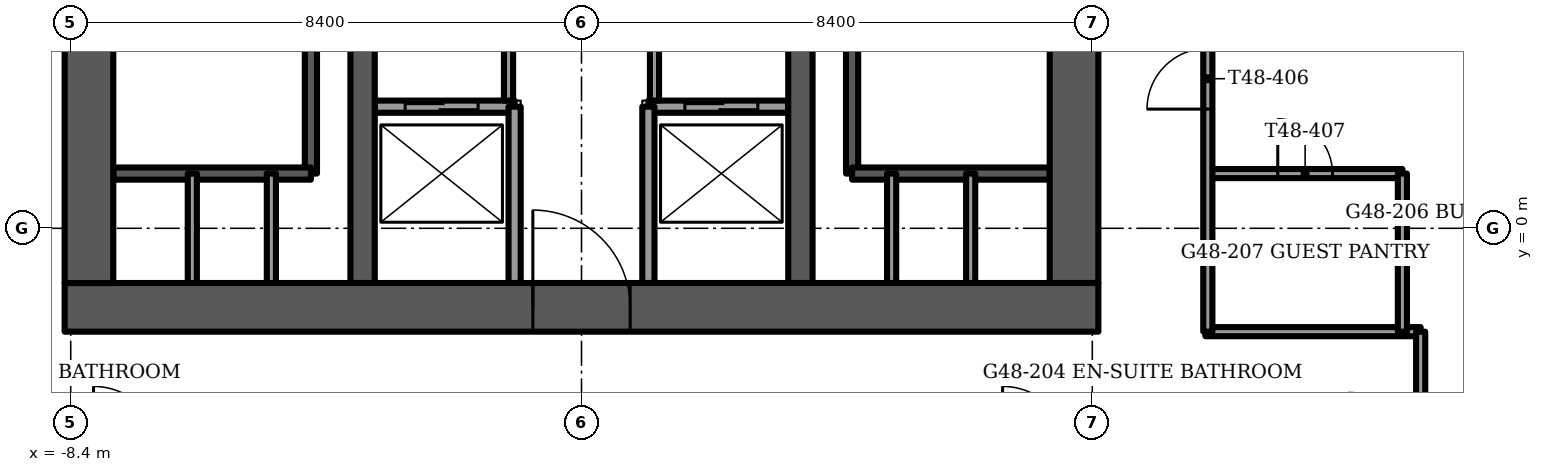
"""IFC4 building model, lengths in metres.
Left out: names, types, materials, properties, quantities, classifications, styles, units other than length and angle.
Written with IfcOpenShell. Run it as: python <this file> out.ifc"""

import sys

from ifc_helpers import new_model, si_unit, direction, frame, frame_2d, origin, place, context, subcontext, project, spatial, rectangle, extrude, element, fill, save


model = new_model("IFC4")
c1 = context("Model", 3, precision=1e-05, world=origin(), true_north=direction((0.0, 1.0)))
c2 = subcontext(c1, "Body", "Model", "MODEL_VIEW")
j1 = project(units=[si_unit("LENGTHUNIT", "METRE"), si_unit("PLANEANGLEUNIT", "RADIAN")], contexts=[c1])
p1 = place(None, origin())
s1 = spatial("IfcSite", under=j1, at=p1, CompositionType="ELEMENT")
p2 = place(p1, origin())
s2 = spatial("IfcBuilding", under=s1, at=p2, CompositionType="ELEMENT")
p3 = place(p2, frame((0.0, 0.0, 194.5)))
s3 = spatial("IfcBuildingStorey", under=s2, at=p3, CompositionType="ELEMENT", Elevation=194.5)
p4 = place(p3, frame((-8.5, -1.3, -0.3), z_axis=(0.0, 0.0, 1.0), x_axis=(1.0, 0.0, 0.0)))
e1 = element("IfcWall", 1, at=p4, inside=s3, PredefinedType="SHEAR", context=c2, shape_type="SweptSolid", body=[
    extrude(rectangle(XDim=17.0, YDim=0.8, at=frame_2d((8.5, 0.0))), origin(), (0.0, 0.0, 1.0), 3.75),
])
p5 = place(p4, frame((7.7, 0.0, 0.0)))
e2 = element("IfcOpeningElement", 2, at=p5, cuts=e1, PredefinedType="OPENING", context=c2, shape_type="SweptSolid", body=[
    extrude(rectangle(XDim=1.6, YDim=2.1, at=frame_2d((0.8, 1.05))), frame((0.0, 0.4, 0.0), z_axis=(0.0, -1.0, 0.0), x_axis=(1.0, 0.0, 0.0)), (0.0, 0.0, 1.0), 0.8),
])
p6 = place(p3, frame((-8.1, -0.9, -0.3), z_axis=(0.0, 0.0, 1.0), x_axis=(0.0, 1.0, 0.0)))
e3 = element("IfcWall", 3, at=p6, inside=s3, PredefinedType="SHEAR", context=c2, shape_type="SweptSolid", body=[
    extrude(rectangle(XDim=9.8, YDim=0.8, at=frame_2d((4.9, 0.0))), origin(), (0.0, 0.0, 1.0), 3.75),
])
p7 = place(p6, frame((8.15, 0.0, 0.0)))
e4 = element("IfcOpeningElement", 4, at=p7, cuts=e3, PredefinedType="OPENING", context=c2, shape_type="SweptSolid", body=[
    extrude(rectangle(XDim=1.1, YDim=2.1, at=frame_2d((0.55, 1.05))), frame((0.0, 0.4, 0.0), z_axis=(0.0, -1.0, 0.0), x_axis=(1.0, 0.0, 0.0)), (0.0, 0.0, 1.0), 0.8),
])
p8 = place(p3, frame((8.1, -0.9, -0.3), z_axis=(0.0, 0.0, 1.0), x_axis=(0.0, 1.0, 0.0)))
e5 = element("IfcWall", 5, at=p8, inside=s3, PredefinedType="SHEAR", context=c2, shape_type="SweptSolid", body=[
    extrude(rectangle(XDim=9.8, YDim=0.8, at=frame_2d((4.9, 0.0))), origin(), (0.0, 0.0, 1.0), 3.75),
])
p9 = place(p8, frame((8.15, 0.0, 0.0)))
e6 = element("IfcOpeningElement", 6, at=p9, cuts=e5, PredefinedType="OPENING", context=c2, shape_type="SweptSolid", body=[
    extrude(rectangle(XDim=1.1, YDim=2.1, at=frame_2d((0.55, 1.05))), frame((0.0, 0.4, 0.0), z_axis=(0.0, -1.0, 0.0), x_axis=(1.0, 0.0, 0.0)), (0.0, 0.0, 1.0), 0.8),
])
for number, where, z_axis, x_axis in (
    (7, (-3.6, -0.9, -0.3), (0.0, 0.0, 1.0), (0.0, 1.0, 0.0)),
    (8, (3.6, -0.9, -0.3), (0.0, 0.0, 1.0), (0.0, 1.0, 0.0)),
):
    element("IfcWall", number, at=place(p3, frame(where, z_axis=z_axis, x_axis=x_axis)), inside=s3, PredefinedType="SHEAR", context=c2, shape_type="SweptSolid", body=[
        extrude(rectangle(XDim=9.8, YDim=0.4, at=frame_2d((4.9, 0.0))), origin(), (0.0, 0.0, 1.0), 3.75),
    ])
p10 = place(p3, frame((11.824, -10.37, 0.0), z_axis=(0.0, 0.0, 1.0), x_axis=(0.499996992154, 0.866027140358, 0.0)))
e9 = element("IfcWall", 9, at=p10, inside=s3, PredefinedType="SOLIDWALL", context=c2, shape_type="SweptSolid", body=[
    extrude(rectangle(XDim=10.264, YDim=0.15, at=frame_2d((5.132, 0.0))), origin(), (0.0, 0.0, 1.0), 3.45),
])
p11 = place(p10, frame((1.269, 0.0, 0.15)))
e10 = element("IfcOpeningElement", 10, at=p11, cuts=e9, PredefinedType="OPENING", context=c2, shape_type="SweptSolid", body=[
    extrude(rectangle(XDim=1.6, YDim=2.2, at=frame_2d((0.8, 1.1))), frame((0.0, 0.075, 0.0), z_axis=(0.0, -1.0, 0.0), x_axis=(1.0, 0.0, 0.0)), (0.0, 0.0, 1.0), 0.15),
])
p12 = place(p10, frame((3.469, 0.0, 0.0)))
e11 = element("IfcOpeningElement", 11, at=p12, cuts=e9, PredefinedType="OPENING", context=c2, shape_type="SweptSolid", body=[
    extrude(rectangle(XDim=1.4, YDim=2.4, at=frame_2d((0.7, 1.2))), frame((0.0, 0.075, 0.0), z_axis=(0.0, -1.0, 0.0), x_axis=(1.0, 0.0, 0.0)), (0.0, 0.0, 1.0), 0.15),
])
p13 = place(p10, frame((5.469, 0.0, 0.15)))
e12 = element("IfcOpeningElement", 12, at=p13, cuts=e9, PredefinedType="OPENING", context=c2, shape_type="SweptSolid", body=[
    extrude(rectangle(XDim=1.6, YDim=2.2, at=frame_2d((0.8, 1.1))), frame((0.0, 0.075, 0.0), z_axis=(0.0, -1.0, 0.0), x_axis=(1.0, 0.0, 0.0)), (0.0, 0.0, 1.0), 0.15),
])
p14 = place(p3, frame((16.956, -0.417, 0.0), z_axis=(0.0, 0.0, 1.0), x_axis=(-0.499996992154, 0.866027140358, 0.0)))
e13 = element("IfcWall", 13, at=p14, inside=s3, PredefinedType="SOLIDWALL", context=c2, shape_type="SweptSolid", body=[
    extrude(rectangle(XDim=10.264, YDim=0.15, at=frame_2d((5.132, 0.0))), origin(), (0.0, 0.0, 1.0), 3.45),
])
p15 = place(p14, frame((0.739, 0.0, 0.15)))
e14 = element("IfcOpeningElement", 14, at=p15, cuts=e13, PredefinedType="OPENING", context=c2, shape_type="SweptSolid", body=[
    extrude(rectangle(XDim=1.6, YDim=2.2, at=frame_2d((0.8, 1.1))), frame((0.0, 0.075, 0.0), z_axis=(0.0, -1.0, 0.0), x_axis=(1.0, 0.0, 0.0)), (0.0, 0.0, 1.0), 0.15),
])
p16 = place(p14, frame((2.939, 0.0, 0.0)))
e15 = element("IfcOpeningElement", 15, at=p16, cuts=e13, PredefinedType="OPENING", context=c2, shape_type="SweptSolid", body=[
    extrude(rectangle(XDim=1.4, YDim=2.4, at=frame_2d((0.7, 1.2))), frame((0.0, 0.075, 0.0), z_axis=(0.0, -1.0, 0.0), x_axis=(1.0, 0.0, 0.0)), (0.0, 0.0, 1.0), 0.15),
])
p17 = place(p14, frame((7.139, 0.0, 0.15)))
e16 = element("IfcOpeningElement", 16, at=p17, cuts=e13, PredefinedType="OPENING", context=c2, shape_type="SweptSolid", body=[
    extrude(rectangle(XDim=1.4, YDim=2.2, at=frame_2d((0.7, 1.1))), frame((0.0, 0.075, 0.0), z_axis=(0.0, -1.0, 0.0), x_axis=(1.0, 0.0, 0.0)), (0.0, 0.0, 1.0), 0.15),
])
p18 = place(p3, frame((-3.4, 2.0, 0.0), z_axis=(0.0, 0.0, 1.0), x_axis=(1.0, 0.0, 0.0)))
e17 = element("IfcWall", 17, at=p18, inside=s3, PredefinedType="PARTITIONING", context=c2, shape_type="SweptSolid", body=[
    extrude(rectangle(XDim=2.3, YDim=0.2, at=frame_2d((1.15, 0.0))), origin(), (0.0, 0.0, 1.0), 3.45),
])
p19 = place(p18, frame((0.5, 0.0, 0.0)))
e18 = element("IfcOpeningElement", 18, at=p19, cuts=e17, PredefinedType="OPENING", context=c2, shape_type="SweptSolid", body=[
    extrude(rectangle(XDim=1.2, YDim=2.1, at=frame_2d((0.6, 1.05))), frame((0.0, 0.1, 0.0), z_axis=(0.0, -1.0, 0.0), x_axis=(1.0, 0.0, 0.0)), (0.0, 0.0, 1.0), 0.2),
])
p20 = place(p3, frame((1.1, 2.0, 0.0), z_axis=(0.0, 0.0, 1.0), x_axis=(1.0, 0.0, 0.0)))
e19 = element("IfcWall", 19, at=p20, inside=s3, PredefinedType="PARTITIONING", context=c2, shape_type="SweptSolid", body=[
    extrude(rectangle(XDim=2.3, YDim=0.2, at=frame_2d((1.15, 0.0))), origin(), (0.0, 0.0, 1.0), 3.45),
])
p21 = place(p20, frame((0.6, 0.0, 0.0)))
e20 = element("IfcOpeningElement", 20, at=p21, cuts=e19, PredefinedType="OPENING", context=c2, shape_type="SweptSolid", body=[
    extrude(rectangle(XDim=1.2, YDim=2.1, at=frame_2d((0.6, 1.05))), frame((0.0, 0.1, 0.0), z_axis=(0.0, -1.0, 0.0), x_axis=(1.0, 0.0, 0.0)), (0.0, 0.0, 1.0), 0.2),
])
for number, where, z_axis, x_axis in (
    (21, (-1.1, -0.9, 0.0), (0.0, 0.0, 1.0), (0.0, 1.0, 0.0)),
    (22, (1.1, -0.9, 0.0), (0.0, 0.0, 1.0), (0.0, 1.0, 0.0)),
):
    element("IfcWall", number, at=place(p3, frame(where, z_axis=z_axis, x_axis=x_axis)), inside=s3, PredefinedType="PARTITIONING", context=c2, shape_type="SweptSolid", body=[
        extrude(rectangle(XDim=2.9, YDim=0.2, at=frame_2d((1.45, 0.0))), origin(), (0.0, 0.0, 1.0), 3.45),
    ])
p22 = place(p3, frame((-4.45, 0.9, -0.3), z_axis=(0.0, 0.0, 1.0), x_axis=(0.0, 1.0, 0.0)))
e23 = element("IfcWall", 23, at=p22, inside=s3, PredefinedType="SOLIDWALL", context=c2, shape_type="SweptSolid", body=[
    extrude(rectangle(XDim=8.0, YDim=0.2, at=frame_2d((4.0, 0.0))), origin(), (0.0, 0.0, 1.0), 3.75),
])
p23 = place(p3, frame((-7.7, 0.9, -0.3), z_axis=(0.0, 0.0, 1.0), x_axis=(1.0, 0.0, 0.0)))
e24 = element("IfcWall", 24, at=p23, inside=s3, PredefinedType="SOLIDWALL", context=c2, shape_type="SweptSolid", body=[
    extrude(rectangle(XDim=3.25, YDim=0.2, at=frame_2d((1.625, 0.0))), origin(), (0.0, 0.0, 1.0), 3.75),
])
for number, where, z_axis, x_axis in (
    (25, (-6.4, -0.9, 0.0), (0.0, 0.0, 1.0), (0.0, 1.0, 0.0)),
    (26, (-5.1, -0.9, 0.0), (0.0, 0.0, 1.0), (0.0, 1.0, 0.0)),
):
    element("IfcWall", number, at=place(p3, frame(where, z_axis=z_axis, x_axis=x_axis)), inside=s3, PredefinedType="PARTITIONING", context=c2, shape_type="SweptSolid", body=[
        extrude(rectangle(XDim=1.8, YDim=0.15, at=frame_2d((0.9, 0.0))), origin(), (0.0, 0.0, 1.0), 3.45),
    ])
p24 = place(p3, frame((4.45, 0.9, -0.3), z_axis=(0.0, 0.0, 1.0), x_axis=(0.0, 1.0, 0.0)))
e27 = element("IfcWall", 27, at=p24, inside=s3, PredefinedType="SOLIDWALL", context=c2, shape_type="SweptSolid", body=[
    extrude(rectangle(XDim=8.0, YDim=0.2, at=frame_2d((4.0, 0.0))), origin(), (0.0, 0.0, 1.0), 3.75),
])
p25 = place(p3, frame((4.45, 0.9, -0.3), z_axis=(0.0, 0.0, 1.0), x_axis=(1.0, 0.0, 0.0)))
e28 = element("IfcWall", 28, at=p25, inside=s3, PredefinedType="SOLIDWALL", context=c2, shape_type="SweptSolid", body=[
    extrude(rectangle(XDim=3.25, YDim=0.2, at=frame_2d((1.625, 0.0))), origin(), (0.0, 0.0, 1.0), 3.75),
])
for number, where, z_axis, x_axis in (
    (29, (5.1, -0.9, 0.0), (0.0, 0.0, 1.0), (0.0, 1.0, 0.0)),
    (30, (6.4, -0.9, 0.0), (0.0, 0.0, 1.0), (0.0, 1.0, 0.0)),
):
    element("IfcWall", number, at=place(p3, frame(where, z_axis=z_axis, x_axis=x_axis)), inside=s3, PredefinedType="PARTITIONING", context=c2, shape_type="SweptSolid", body=[
        extrude(rectangle(XDim=1.8, YDim=0.15, at=frame_2d((0.9, 0.0))), origin(), (0.0, 0.0, 1.0), 3.45),
    ])
p26 = place(p3, frame((-1.2, 2.1, 0.0), z_axis=(0.0, 0.0, 1.0), x_axis=(0.0, 1.0, 0.0)))
e31 = element("IfcWall", 31, at=p26, inside=s3, PredefinedType="PARTITIONING", context=c2, shape_type="SweptSolid", body=[
    extrude(rectangle(XDim=3.8, YDim=0.15, at=frame_2d((1.9, 0.0))), origin(), (0.0, 0.0, 1.0), 3.45),
])
p27 = place(p26, frame((1.5, 0.0, 0.0)))
e32 = element("IfcOpeningElement", 32, at=p27, cuts=e31, PredefinedType="OPENING", context=c2, shape_type="SweptSolid", body=[
    extrude(rectangle(XDim=0.8, YDim=2.1, at=frame_2d((0.4, 1.05))), frame((0.0, 0.075, 0.0), z_axis=(0.0, -1.0, 0.0), x_axis=(1.0, 0.0, 0.0)), (0.0, 0.0, 1.0), 0.15),
])
p28 = place(p3, frame((1.2, 2.1, 0.0), z_axis=(0.0, 0.0, 1.0), x_axis=(0.0, 1.0, 0.0)))
e33 = element("IfcWall", 33, at=p28, inside=s3, PredefinedType="PARTITIONING", context=c2, shape_type="SweptSolid", body=[
    extrude(rectangle(XDim=3.8, YDim=0.15, at=frame_2d((1.9, 0.0))), origin(), (0.0, 0.0, 1.0), 3.45),
])
p29 = place(p28, frame((1.5, 0.0, 0.0)))
e34 = element("IfcOpeningElement", 34, at=p29, cuts=e33, PredefinedType="OPENING", context=c2, shape_type="SweptSolid", body=[
    extrude(rectangle(XDim=0.8, YDim=2.1, at=frame_2d((0.4, 1.05))), frame((0.0, 0.075, 0.0), z_axis=(0.0, -1.0, 0.0), x_axis=(1.0, 0.0, 0.0)), (0.0, 0.0, 1.0), 0.15),
])
p30 = place(p3, frame((10.26, -1.7, 0.0), z_axis=(0.0, 0.0, 1.0), x_axis=(1.0, 0.0, 0.0)))
e35 = element("IfcWall", 35, at=p30, inside=s3, PredefinedType="PARTITIONING", context=c2, shape_type="SweptSolid", body=[
    extrude(rectangle(XDim=3.54, YDim=0.15, at=frame_2d((1.77, 0.0))), origin(), (0.0, 0.0, 1.0), 3.45),
])
p31 = place(p3, frame((10.3, 0.9, 0.0), z_axis=(0.0, 0.0, 1.0), x_axis=(1.0, 0.0, 0.0)))
e36 = element("IfcWall", 36, at=p31, inside=s3, PredefinedType="PARTITIONING", context=c2, shape_type="SweptSolid", body=[
    extrude(rectangle(XDim=3.2, YDim=0.15, at=frame_2d((1.6, 0.0))), origin(), (0.0, 0.0, 1.0), 3.45),
])
p32 = place(p31, frame((1.15, 0.0, 0.0)))
e37 = element("IfcOpeningElement", 37, at=p32, cuts=e36, PredefinedType="OPENING", context=c2, shape_type="SweptSolid", body=[
    extrude(rectangle(XDim=0.9, YDim=2.1, at=frame_2d((0.45, 1.05))), frame((0.0, 0.075, 0.0), z_axis=(0.0, -1.0, 0.0), x_axis=(1.0, 0.0, 0.0)), (0.0, 0.0, 1.0), 0.15),
])
p33 = place(p3, frame((13.8, -3.7, 0.0), z_axis=(0.0, 0.0, 1.0), x_axis=(0.0, 1.0, 0.0)))
e38 = element("IfcWall", 38, at=p33, inside=s3, PredefinedType="PARTITIONING", context=c2, shape_type="SweptSolid", body=[
    extrude(rectangle(XDim=2.0, YDim=0.15, at=frame_2d((1.0, 0.0))), origin(), (0.0, 0.0, 1.0), 3.45),
])
p34 = place(p3, frame((13.5, -1.7, 0.0), z_axis=(0.0, 0.0, 1.0), x_axis=(0.0, 1.0, 0.0)))
e39 = element("IfcWall", 39, at=p34, inside=s3, PredefinedType="PARTITIONING", context=c2, shape_type="SweptSolid", body=[
    extrude(rectangle(XDim=2.6, YDim=0.15, at=frame_2d((1.3, 0.0))), origin(), (0.0, 0.0, 1.0), 3.45),
])
p35 = place(p3, frame((10.3, -1.7, 0.0), z_axis=(0.0, 0.0, 1.0), x_axis=(0.0, 1.0, 0.0)))
e40 = element("IfcWall", 40, at=p35, inside=s3, PredefinedType="PARTITIONING", context=c2, shape_type="SweptSolid", body=[
    extrude(rectangle(XDim=8.1, YDim=0.15, at=frame_2d((4.05, 0.0))), origin(), (0.0, 0.0, 1.0), 3.45),
])
p36 = place(p35, frame((3.66, 0.0, 0.0)))
e41 = element("IfcOpeningElement", 41, at=p36, cuts=e40, PredefinedType="OPENING", context=c2, shape_type="SweptSolid", body=[
    extrude(rectangle(XDim=1.0, YDim=2.1, at=frame_2d((0.5, 1.05))), frame((0.0, 0.075, 0.0), z_axis=(0.0, -1.0, 0.0), x_axis=(1.0, 0.0, 0.0)), (0.0, 0.0, 1.0), 0.15),
])
p37 = place(p35, frame((6.75, 0.0, 0.0)))
e42 = element("IfcOpeningElement", 42, at=p37, cuts=e40, PredefinedType="OPENING", context=c2, shape_type="SweptSolid", body=[
    extrude(rectangle(XDim=1.0, YDim=2.1, at=frame_2d((0.5, 1.05))), frame((0.0, 0.075, 0.0), z_axis=(0.0, -1.0, 0.0), x_axis=(1.0, 0.0, 0.0)), (0.0, 0.0, 1.0), 0.15),
])
p38 = place(p19, origin())
e43 = element("IfcDoor", 43, at=p38, inside=s3, OperationType="SLIDING_TO_LEFT", PredefinedType="DOOR", context=c2, shape_type="SweptSolid", body=[
    extrude(rectangle(XDim=1.2, YDim=2.1, at=frame_2d((0.6, 1.05))), frame((0.0, 0.025, 0.0), z_axis=(0.0, -1.0, 0.0), x_axis=(1.0, 0.0, 0.0)), (0.0, 0.0, 1.0), 0.05),
])
fill(e18, e43)
p39 = place(p21, origin())
e44 = element("IfcDoor", 44, at=p39, inside=s3, OperationType="SLIDING_TO_LEFT", PredefinedType="DOOR", context=c2, shape_type="SweptSolid", body=[
    extrude(rectangle(XDim=1.2, YDim=2.1, at=frame_2d((0.6, 1.05))), frame((0.0, 0.025, 0.0), z_axis=(0.0, -1.0, 0.0), x_axis=(1.0, 0.0, 0.0)), (0.0, 0.0, 1.0), 0.05),
])
fill(e20, e44)
p40 = place(p5, origin())
e45 = element("IfcDoor", 45, at=p40, inside=s3, OperationType="DOUBLE_DOOR_SINGLE_SWING", PredefinedType="DOOR", context=c2, shape_type="SweptSolid", body=[
    extrude(rectangle(XDim=1.6, YDim=2.1, at=frame_2d((0.8, 1.05))), frame((0.0, 0.025, 0.0), z_axis=(0.0, -1.0, 0.0), x_axis=(1.0, 0.0, 0.0)), (0.0, 0.0, 1.0), 0.05),
])
fill(e2, e45)
p41 = place(p36, origin())
e46 = element("IfcDoor", 46, at=p41, inside=s3, OperationType="SINGLE_SWING_RIGHT", PredefinedType="DOOR", context=c2, shape_type="SweptSolid", body=[
    extrude(rectangle(XDim=1.0, YDim=2.1, at=frame_2d((0.5, 1.05))), frame((0.0, 0.025, 0.0), z_axis=(0.0, -1.0, 0.0), x_axis=(1.0, 0.0, 0.0)), (0.0, 0.0, 1.0), 0.05),
])
fill(e41, e46)
p42 = place(p32, origin())
e47 = element("IfcDoor", 47, at=p42, inside=s3, OperationType="SINGLE_SWING_LEFT", PredefinedType="DOOR", context=c2, shape_type="SweptSolid", body=[
    extrude(rectangle(XDim=0.9, YDim=2.1, at=frame_2d((0.45, 1.05))), frame((0.0, 0.025, 0.0), z_axis=(0.0, -1.0, 0.0), x_axis=(1.0, 0.0, 0.0)), (0.0, 0.0, 1.0), 0.05),
])
fill(e37, e47)
save(model, sys.argv[1])
